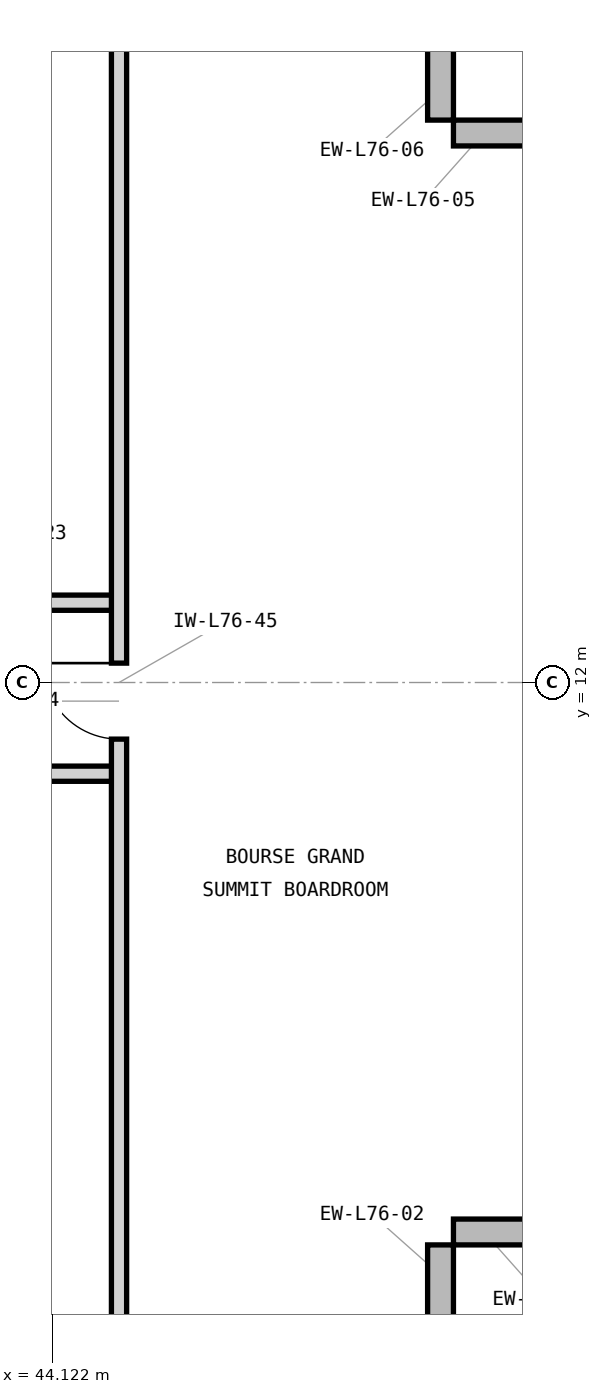
"""IFC4 building model, lengths in metres.
Left out: names, types, materials, properties, quantities, classifications, styles, units other than length and angle.
Written with IfcOpenShell. Run it as: python <this file> out.ifc"""

import sys

from ifc_helpers import new_model, si_unit, direction, frame, frame_2d, origin, place, context, subcontext, project, spatial, rectangle, extrude, element, fill, save


model = new_model("IFC4")
c1 = context("Model", 3, precision=1e-05, world=origin(), true_north=direction((0.0, 1.0)))
c2 = subcontext(c1, "Body", "Model", "MODEL_VIEW")
j1 = project(units=[si_unit("LENGTHUNIT", "METRE"), si_unit("PLANEANGLEUNIT", "RADIAN")], contexts=[c1])
p1 = place(None, origin())
s1 = spatial("IfcSite", under=j1, at=p1, CompositionType="ELEMENT")
p2 = place(p1, origin())
s2 = spatial("IfcBuilding", under=s1, at=p2, CompositionType="ELEMENT")
p3 = place(p2, frame((0.0, 0.0, 309.3)))
s3 = spatial("IfcBuildingStorey", under=s2, at=p3, CompositionType="ELEMENT", Elevation=309.3)
for number, where, z_axis, x_axis in (
    (1, (49.23, 3.0, 0.0), (0.0, 0.0, 1.0), (0.0, 1.0, 0.0)),
    (2, (49.4, 4.77, 0.0), (0.0, 0.0, 1.0), (1.0, 0.0, 0.0)),
    (3, (51.0, 19.23, 0.0), (0.0, 0.0, 1.0), (-1.0, 0.0, 0.0)),
    (4, (49.23, 19.4, 0.0), (0.0, 0.0, 1.0), (0.0, 1.0, 0.0)),
):
    element("IfcWall", number, at=place(p3, frame(where, z_axis=z_axis, x_axis=x_axis)), inside=s3, PredefinedType="STANDARD", context=c2, shape_type="SweptSolid", body=[
        extrude(rectangle(XDim=1.6, YDim=0.34, at=frame_2d((0.8, 0.0))), origin(), (0.0, 0.0, 1.0), 3.62),
    ])
p4 = place(p3, frame((39.2, 10.8, 0.0), z_axis=(0.0, 0.0, 1.0), x_axis=(1.0, 0.0, 0.0)))
e5 = element("IfcWall", 5, at=p4, inside=s3, PredefinedType="PARTITIONING", context=c2, shape_type="SweptSolid", body=[
    extrude(rectangle(XDim=5.8, YDim=0.2, at=frame_2d((2.9, 0.0))), origin(), (0.0, 0.0, 1.0), 3.61),
])
p5 = place(p4, frame((2.4, 0.0, 0.0)))
e6 = element("IfcOpeningElement", 6, at=p5, cuts=e5, PredefinedType="OPENING", context=c2, shape_type="SweptSolid", body=[
    extrude(rectangle(XDim=1.0, YDim=2.15, at=frame_2d((0.5, 1.075))), frame((0.0, 0.11, 0.0), z_axis=(0.0, -1.0, 0.0), x_axis=(1.0, 0.0, 0.0)), (0.0, 0.0, 1.0), 0.22),
])
p6 = place(p3, frame((39.2, 13.05, 0.0), z_axis=(0.0, 0.0, 1.0), x_axis=(1.0, 0.0, 0.0)))
e7 = element("IfcWall", 7, at=p6, inside=s3, PredefinedType="PARTITIONING", context=c2, shape_type="SweptSolid", body=[
    extrude(rectangle(XDim=5.8, YDim=0.2, at=frame_2d((2.9, 0.0))), origin(), (0.0, 0.0, 1.0), 3.61),
])
p7 = place(p6, frame((2.4, 0.0, 0.0)))
e8 = element("IfcOpeningElement", 8, at=p7, cuts=e7, PredefinedType="OPENING", context=c2, shape_type="SweptSolid", body=[
    extrude(rectangle(XDim=1.0, YDim=2.15, at=frame_2d((0.5, 1.075))), frame((0.0, 0.11, 0.0), z_axis=(0.0, -1.0, 0.0), x_axis=(1.0, 0.0, 0.0)), (0.0, 0.0, 1.0), 0.22),
])
p8 = place(p3, frame((45.0, 3.18, 0.0), z_axis=(0.0, 0.0, 1.0), x_axis=(0.0, 1.0, 0.0)))
e9 = element("IfcWall", 9, at=p8, inside=s3, PredefinedType="PARTITIONING", context=c2, shape_type="SweptSolid", body=[
    extrude(rectangle(XDim=17.64, YDim=0.2, at=frame_2d((8.82, 0.0))), origin(), (0.0, 0.0, 1.0), 3.61),
])
p9 = place(p8, frame((8.075, 0.0, 0.0)))
e10 = element("IfcOpeningElement", 10, at=p9, cuts=e9, PredefinedType="OPENING", context=c2, shape_type="SweptSolid", body=[
    extrude(rectangle(XDim=1.0, YDim=2.15, at=frame_2d((0.5, 1.075))), frame((0.0, 0.11, 0.0), z_axis=(0.0, -1.0, 0.0), x_axis=(1.0, 0.0, 0.0)), (0.0, 0.0, 1.0), 0.22),
])
p10 = place(p9, origin())
e11 = element("IfcDoor", 11, at=p10, inside=s3, OperationType="SINGLE_SWING_RIGHT", PredefinedType="DOOR", context=c2, shape_type="SweptSolid", body=[
    extrude(rectangle(XDim=1.0, YDim=2.15, at=frame_2d((0.5, 1.075))), frame((0.0, 0.025, 0.0), z_axis=(0.0, -1.0, 0.0), x_axis=(1.0, 0.0, 0.0)), (0.0, 0.0, 1.0), 0.05),
])
fill(e10, e11)
save(model, sys.argv[1])
